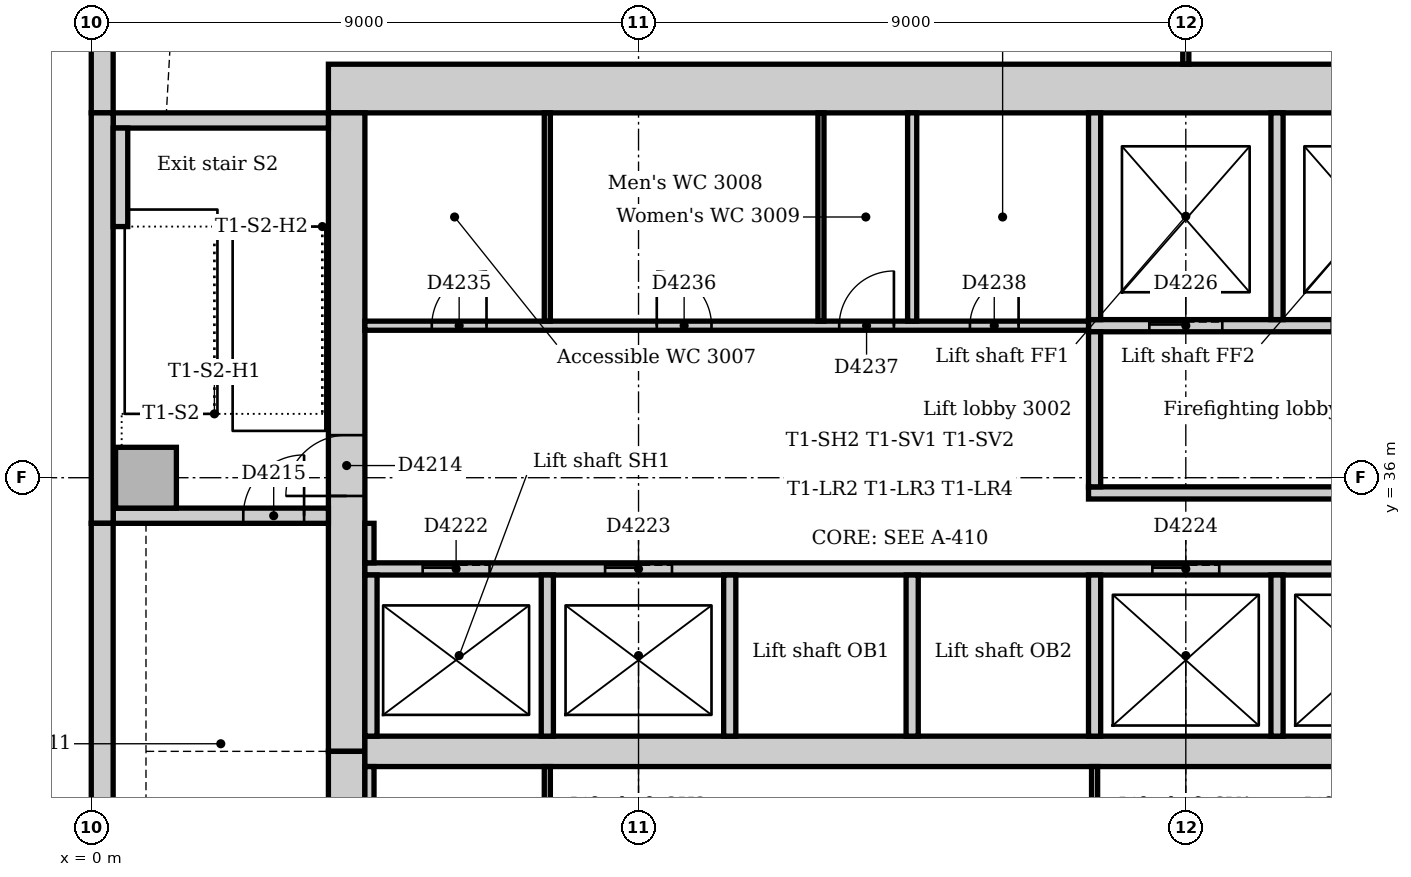
"""IFC4 building model, lengths in metres.
Left out: names, types, materials, properties, quantities, classifications, styles, units other than length and angle.
Written with IfcOpenShell. Run it as: python <this file> out.ifc"""

import sys

from ifc_helpers import new_model, si_unit, direction, frame, frame_2d, origin, origin_2d, place, context, subcontext, project, spatial, rectangle, extrude, element, fill, save


model = new_model("IFC4")
c1 = context("Model", 3, precision=1e-05, world=origin(), true_north=direction((0.0, 1.0)))
c2 = subcontext(c1, "Body", "Model", "MODEL_VIEW")
j1 = project(units=[si_unit("LENGTHUNIT", "METRE"), si_unit("PLANEANGLEUNIT", "RADIAN")], contexts=[c1])
p1 = place(None, origin())
s1 = spatial("IfcSite", under=j1, at=p1, CompositionType="ELEMENT")
p2 = place(p1, origin())
s2 = spatial("IfcBuilding", under=s1, at=p2, CompositionType="ELEMENT")
p3 = place(p2, frame((0.0, 0.0, 128.0)))
s3 = spatial("IfcBuildingStorey", under=s2, at=p3, CompositionType="ELEMENT", Elevation=128.0)
p4 = place(p3, frame((23.3, 42.4, 0.0), z_axis=(0.0, 0.0, 1.0), x_axis=(-1.0, 0.0, 0.0)))
e1 = element("IfcWall", 1, at=p4, inside=s3, PredefinedType="SOLIDWALL", context=c2, shape_type="SweptSolid", body=[
    extrude(rectangle(XDim=19.4, YDim=0.8, at=frame_2d((9.7, 0.0))), origin(), (0.0, 0.0, 1.0), 4.0),
])
p5 = place(p3, frame((4.2, 42.0, 0.0), z_axis=(0.0, 0.0, 1.0), x_axis=(0.0, -1.0, 0.0)))
e2 = element("IfcWall", 2, at=p5, inside=s3, PredefinedType="SOLIDWALL", context=c2, shape_type="SweptSolid", body=[
    extrude(rectangle(XDim=10.5, YDim=0.6, at=frame_2d((5.25, 0.0))), origin(), (0.0, 0.0, 1.0), 4.0),
])
p6 = place(p5, frame((5.3, 0.0, 0.0)))
e3 = element("IfcOpeningElement", 3, at=p6, cuts=e2, PredefinedType="OPENING", context=c2, shape_type="SweptSolid", body=[
    extrude(rectangle(XDim=1.0, YDim=2.1, at=frame_2d((0.5, 1.05))), frame((0.0, 0.31, 0.0), z_axis=(0.0, -1.0, 0.0), x_axis=(1.0, 0.0, 0.0)), (0.0, 0.0, 1.0), 0.62),
])
p7 = place(p3, frame((4.2, 31.5, 0.0), z_axis=(0.0, 0.0, 1.0), x_axis=(0.0, -1.0, 0.0)))
e4 = element("IfcWall", 4, at=p7, inside=s3, PredefinedType="SOLIDWALL", context=c2, shape_type="SweptSolid", body=[
    extrude(rectangle(XDim=10.5, YDim=0.6, at=frame_2d((5.25, 0.0))), origin(), (0.0, 0.0, 1.0), 4.0),
])
p8 = place(p7, frame((4.25, 0.0, 0.0)))
e5 = element("IfcOpeningElement", 5, at=p8, cuts=e4, PredefinedType="OPENING", context=c2, shape_type="SweptSolid", body=[
    extrude(rectangle(XDim=1.0, YDim=2.1, at=frame_2d((0.5, 1.05))), frame((0.0, 0.31, 0.0), z_axis=(0.0, -1.0, 0.0), x_axis=(1.0, 0.0, 0.0)), (0.0, 0.0, 1.0), 0.62),
])
p9 = place(p3, frame((4.5, 31.5, 0.0), z_axis=(0.0, 0.0, 1.0), x_axis=(1.0, 0.0, 0.0)))
e6 = element("IfcWall", 6, at=p9, inside=s3, PredefinedType="SOLIDWALL", context=c2, shape_type="SweptSolid", body=[
    extrude(rectangle(XDim=18.0, YDim=0.5, at=frame_2d((9.0, 0.0))), origin(), (0.0, 0.0, 1.0), 4.0),
])
p10 = place(p3, frame((0.36, 35.375, 0.0), z_axis=(0.0, 0.0, 1.0), x_axis=(1.0, 0.0, 0.0)))
e7 = element("IfcWall", 7, at=p10, inside=s3, PredefinedType="SOLIDWALL", context=c2, shape_type="SweptSolid", body=[
    extrude(rectangle(XDim=3.54, YDim=0.25, at=frame_2d((1.77, 0.0))), origin(), (0.0, 0.0, 1.0), 4.0),
])
p11 = place(p10, frame((2.14, 0.0, 0.0)))
e8 = element("IfcOpeningElement", 8, at=p11, cuts=e7, PredefinedType="OPENING", context=c2, shape_type="SweptSolid", body=[
    extrude(rectangle(XDim=1.0, YDim=2.1, at=frame_2d((0.5, 1.05))), frame((0.0, 0.135, 0.0), z_axis=(0.0, -1.0, 0.0), x_axis=(1.0, 0.0, 0.0)), (0.0, 0.0, 1.0), 0.27),
])
p12 = place(p3, frame((3.9, 41.875, 0.0), z_axis=(0.0, 0.0, 1.0), x_axis=(-1.0, 0.0, 0.0)))
e9 = element("IfcWall", 9, at=p12, inside=s3, PredefinedType="SOLIDWALL", context=c2, shape_type="SweptSolid", body=[
    extrude(rectangle(XDim=3.54, YDim=0.25, at=frame_2d((1.77, 0.0))), origin(), (0.0, 0.0, 1.0), 4.0),
])
p13 = place(p3, frame((0.9, 36.0, 0.0), z_axis=(0.0, 0.0, 1.0), x_axis=(1.0, 0.0, 0.0)))
e10 = element("IfcColumn", 10, at=p13, inside=s3, PredefinedType="COLUMN", context=c2, shape_type="SweptSolid", body=[
    extrude(rectangle(XDim=1.0, YDim=1.0, at=origin_2d()), origin(), (0.0, 0.0, 1.0), 4.0),
])
p14 = place(p3, frame((0.18, 45.257, 0.0), z_axis=(0.0, 0.0, 1.0), x_axis=(0.0, -1.0, 0.0)))
e11 = element("IfcWall", 11, at=p14, inside=s3, PredefinedType="STANDARD", context=c2, shape_type="SweptSolid", body=[
    extrude(rectangle(XDim=3.257, YDim=0.36, at=frame_2d((1.629, 0.0))), origin(), (0.0, 0.0, 1.0), 3.85),
])
p15 = place(p3, frame((0.18, 42.0, 0.0), z_axis=(0.0, 0.0, 1.0), x_axis=(0.0, -1.0, 0.0)))
e12 = element("IfcWall", 12, at=p15, inside=s3, PredefinedType="STANDARD", context=c2, shape_type="SweptSolid", body=[
    extrude(rectangle(XDim=6.75, YDim=0.36, at=frame_2d((3.375, 0.0))), origin(), (0.0, 0.0, 1.0), 3.85),
])
p16 = place(p3, frame((0.18, 35.25, 0.0), z_axis=(0.0, 0.0, 1.0), x_axis=(0.0, -1.0, 0.0)))
e13 = element("IfcWall", 13, at=p16, inside=s3, PredefinedType="STANDARD", context=c2, shape_type="SweptSolid", body=[
    extrude(rectangle(XDim=7.5, YDim=0.36, at=frame_2d((3.75, 0.0))), origin(), (0.0, 0.0, 1.0), 3.85),
])
p17 = place(p3, frame((0.48, 40.13, 0.0), z_axis=(0.0, 0.0, 1.0), x_axis=(0.0, 1.0, 0.0)))
e14 = element("IfcWall", 14, at=p17, inside=s3, PredefinedType="STANDARD", context=c2, shape_type="SweptSolid", body=[
    extrude(rectangle(XDim=1.62, YDim=0.24, at=frame_2d((0.81, 0.0))), origin(), (0.0, 0.0, 1.0), 4.0),
])
p18 = place(p3, frame((16.4, 35.75, 0.0), z_axis=(0.0, 0.0, 1.0), x_axis=(1.0, 0.0, 0.0)))
e15 = element("IfcWall", 15, at=p18, inside=s3, PredefinedType="PARTITIONING", context=c2, shape_type="SweptSolid", body=[
    extrude(rectangle(XDim=6.1, YDim=0.2, at=frame_2d((3.05, 0.0))), origin(), (0.0, 0.0, 1.0), 3.85),
])
p19 = place(p3, frame((16.4, 38.5, 0.0), z_axis=(0.0, 0.0, 1.0), x_axis=(1.0, 0.0, 0.0)))
e16 = element("IfcWall", 16, at=p19, inside=s3, PredefinedType="PARTITIONING", context=c2, shape_type="SweptSolid", body=[
    extrude(rectangle(XDim=6.1, YDim=0.2, at=frame_2d((3.05, 0.0))), origin(), (0.0, 0.0, 1.0), 3.85),
])
p20 = place(p19, frame((1.0, 0.0, 0.0)))
e17 = element("IfcOpeningElement", 17, at=p20, cuts=e16, PredefinedType="OPENING", context=c2, shape_type="SweptSolid", body=[
    extrude(rectangle(XDim=1.2, YDim=2.1, at=frame_2d((0.6, 1.05))), frame((0.0, 0.11, 0.0), z_axis=(0.0, -1.0, 0.0), x_axis=(1.0, 0.0, 0.0)), (0.0, 0.0, 1.0), 0.22),
])
p21 = place(p19, frame((4.0, 0.0, 0.0)))
e18 = element("IfcOpeningElement", 18, at=p21, cuts=e16, PredefinedType="OPENING", context=c2, shape_type="SweptSolid", body=[
    extrude(rectangle(XDim=1.2, YDim=2.1, at=frame_2d((0.6, 1.05))), frame((0.0, 0.11, 0.0), z_axis=(0.0, -1.0, 0.0), x_axis=(1.0, 0.0, 0.0)), (0.0, 0.0, 1.0), 0.22),
])
p22 = place(p3, frame((16.5, 35.85, 0.0), z_axis=(0.0, 0.0, 1.0), x_axis=(0.0, 1.0, 0.0)))
e19 = element("IfcWall", 19, at=p22, inside=s3, PredefinedType="PARTITIONING", context=c2, shape_type="SweptSolid", body=[
    extrude(rectangle(XDim=2.55, YDim=0.2, at=frame_2d((1.275, 0.0))), origin(), (0.0, 0.0, 1.0), 3.85),
])
p23 = place(p3, frame((4.5, 34.5, 0.0), z_axis=(0.0, 0.0, 1.0), x_axis=(1.0, 0.0, 0.0)))
e20 = element("IfcWall", 20, at=p23, inside=s3, PredefinedType="PARTITIONING", context=c2, shape_type="SweptSolid", body=[
    extrude(rectangle(XDim=18.0, YDim=0.2, at=frame_2d((9.0, 0.0))), origin(), (0.0, 0.0, 1.0), 3.85),
])
p24 = place(p23, frame((0.95, 0.0, 0.0)))
e21 = element("IfcOpeningElement", 21, at=p24, cuts=e20, PredefinedType="OPENING", context=c2, shape_type="SweptSolid", body=[
    extrude(rectangle(XDim=1.1, YDim=2.1, at=frame_2d((0.55, 1.05))), frame((0.0, 0.11, 0.0), z_axis=(0.0, -1.0, 0.0), x_axis=(1.0, 0.0, 0.0)), (0.0, 0.0, 1.0), 0.22),
])
p25 = place(p23, frame((3.95, 0.0, 0.0)))
e22 = element("IfcOpeningElement", 22, at=p25, cuts=e20, PredefinedType="OPENING", context=c2, shape_type="SweptSolid", body=[
    extrude(rectangle(XDim=1.1, YDim=2.1, at=frame_2d((0.55, 1.05))), frame((0.0, 0.11, 0.0), z_axis=(0.0, -1.0, 0.0), x_axis=(1.0, 0.0, 0.0)), (0.0, 0.0, 1.0), 0.22),
])
p26 = place(p23, frame((12.95, 0.0, 0.0)))
e23 = element("IfcOpeningElement", 23, at=p26, cuts=e20, PredefinedType="OPENING", context=c2, shape_type="SweptSolid", body=[
    extrude(rectangle(XDim=1.1, YDim=2.1, at=frame_2d((0.55, 1.05))), frame((0.0, 0.11, 0.0), z_axis=(0.0, -1.0, 0.0), x_axis=(1.0, 0.0, 0.0)), (0.0, 0.0, 1.0), 0.22),
])
p27 = place(p23, frame((15.95, 0.0, 0.0)))
e24 = element("IfcOpeningElement", 24, at=p27, cuts=e20, PredefinedType="OPENING", context=c2, shape_type="SweptSolid", body=[
    extrude(rectangle(XDim=1.1, YDim=2.1, at=frame_2d((0.55, 1.05))), frame((0.0, 0.11, 0.0), z_axis=(0.0, -1.0, 0.0), x_axis=(1.0, 0.0, 0.0)), (0.0, 0.0, 1.0), 0.22),
])
for number, where, z_axis, x_axis in (
    (25, (16.5, 38.6, 0.0), (0.0, 0.0, 1.0), (0.0, 1.0, 0.0)),
    (26, (19.5, 38.6, 0.0), (0.0, 0.0, 1.0), (0.0, 1.0, 0.0)),
):
    element("IfcWall", number, at=place(p3, frame(where, z_axis=z_axis, x_axis=x_axis)), inside=s3, PredefinedType="PARTITIONING", context=c2, shape_type="SweptSolid", body=[
        extrude(rectangle(XDim=3.4, YDim=0.2, at=frame_2d((1.7, 0.0))), origin(), (0.0, 0.0, 1.0), 3.85),
    ])
for number, where, z_axis, x_axis in (
    (27, (4.6, 31.75, 0.0), (0.0, 0.0, 1.0), (0.0, 1.0, 0.0)),
    (28, (7.5, 31.75, 0.0), (0.0, 0.0, 1.0), (0.0, 1.0, 0.0)),
    (29, (10.5, 31.75, 0.0), (0.0, 0.0, 1.0), (0.0, 1.0, 0.0)),
    (30, (13.5, 31.75, 0.0), (0.0, 0.0, 1.0), (0.0, 1.0, 0.0)),
    (31, (16.5, 31.75, 0.0), (0.0, 0.0, 1.0), (0.0, 1.0, 0.0)),
    (32, (19.5, 31.75, 0.0), (0.0, 0.0, 1.0), (0.0, 1.0, 0.0)),
):
    element("IfcWall", number, at=place(p3, frame(where, z_axis=z_axis, x_axis=x_axis)), inside=s3, PredefinedType="PARTITIONING", context=c2, shape_type="SweptSolid", body=[
        extrude(rectangle(XDim=2.65, YDim=0.2, at=frame_2d((1.325, 0.0))), origin(), (0.0, 0.0, 1.0), 3.85),
    ])
p28 = place(p3, frame((4.5, 38.5, 0.0), z_axis=(0.0, 0.0, 1.0), x_axis=(1.0, 0.0, 0.0)))
e33 = element("IfcWall", 33, at=p28, inside=s3, PredefinedType="PARTITIONING", context=c2, shape_type="SweptSolid", body=[
    extrude(rectangle(XDim=11.9, YDim=0.15, at=frame_2d((5.95, 0.0))), origin(), (0.0, 0.0, 1.0), 3.85),
])
p29 = place(p28, frame((1.1, 0.0, 0.0)))
e34 = element("IfcOpeningElement", 34, at=p29, cuts=e33, PredefinedType="OPENING", context=c2, shape_type="SweptSolid", body=[
    extrude(rectangle(XDim=0.9, YDim=2.1, at=frame_2d((0.45, 1.05))), frame((0.0, 0.085, 0.0), z_axis=(0.0, -1.0, 0.0), x_axis=(1.0, 0.0, 0.0)), (0.0, 0.0, 1.0), 0.17),
])
p30 = place(p28, frame((4.8, 0.0, 0.0)))
e35 = element("IfcOpeningElement", 35, at=p30, cuts=e33, PredefinedType="OPENING", context=c2, shape_type="SweptSolid", body=[
    extrude(rectangle(XDim=0.9, YDim=2.1, at=frame_2d((0.45, 1.05))), frame((0.0, 0.085, 0.0), z_axis=(0.0, -1.0, 0.0), x_axis=(1.0, 0.0, 0.0)), (0.0, 0.0, 1.0), 0.17),
])
p31 = place(p28, frame((7.8, 0.0, 0.0)))
e36 = element("IfcOpeningElement", 36, at=p31, cuts=e33, PredefinedType="OPENING", context=c2, shape_type="SweptSolid", body=[
    extrude(rectangle(XDim=0.9, YDim=2.1, at=frame_2d((0.45, 1.05))), frame((0.0, 0.085, 0.0), z_axis=(0.0, -1.0, 0.0), x_axis=(1.0, 0.0, 0.0)), (0.0, 0.0, 1.0), 0.17),
])
p32 = place(p28, frame((9.95, 0.0, 0.0)))
e37 = element("IfcOpeningElement", 37, at=p32, cuts=e33, PredefinedType="OPENING", context=c2, shape_type="SweptSolid", body=[
    extrude(rectangle(XDim=0.8, YDim=2.1, at=frame_2d((0.4, 1.05))), frame((0.0, 0.085, 0.0), z_axis=(0.0, -1.0, 0.0), x_axis=(1.0, 0.0, 0.0)), (0.0, 0.0, 1.0), 0.17),
])
p33 = place(p3, frame((4.575, 28.575, 0.0), z_axis=(0.0, 0.0, 1.0), x_axis=(0.0, 1.0, 0.0)))
e38 = element("IfcWall", 38, at=p33, inside=s3, PredefinedType="PARTITIONING", context=c2, shape_type="SweptSolid", body=[
    extrude(rectangle(XDim=2.675, YDim=0.15, at=frame_2d((1.337, 0.0))), origin(), (0.0, 0.0, 1.0), 3.85),
])
p34 = place(p3, frame((4.575, 34.6, 0.0), z_axis=(0.0, 0.0, 1.0), x_axis=(0.0, 1.0, 0.0)))
e39 = element("IfcWall", 39, at=p34, inside=s3, PredefinedType="PARTITIONING", context=c2, shape_type="SweptSolid", body=[
    extrude(rectangle(XDim=0.65, YDim=0.15, at=frame_2d((0.325, 0.0))), origin(), (0.0, 0.0, 1.0), 3.85),
])
p35 = place(p3, frame((13.5, 38.575, 0.0), z_axis=(0.0, 0.0, 1.0), x_axis=(0.0, 1.0, 0.0)))
e40 = element("IfcWall", 40, at=p35, inside=s3, PredefinedType="PARTITIONING", context=c2, shape_type="SweptSolid", body=[
    extrude(rectangle(XDim=3.425, YDim=0.15, at=frame_2d((1.712, 0.0))), origin(), (0.0, 0.0, 1.0), 3.85),
])
p36 = place(p3, frame((18.0, 42.8, 0.0), z_axis=(0.0, 0.0, 1.0), x_axis=(0.0, 1.0, 0.0)))
e41 = element("IfcWall", 41, at=p36, inside=s3, PredefinedType="PARTITIONING", context=c2, shape_type="SweptSolid", body=[
    extrude(rectangle(XDim=0.8, YDim=0.1, at=frame_2d((0.4, 0.0))), origin(), (0.0, 0.0, 1.0), 3.85),
])
for number, where, z_axis, x_axis in (
    (42, (7.5, 38.575, 0.0), (0.0, 0.0, 1.0), (0.0, 1.0, 0.0)),
    (43, (12.0, 38.575, 0.0), (0.0, 0.0, 1.0), (0.0, 1.0, 0.0)),
):
    element("IfcWall", number, at=place(p3, frame(where, z_axis=z_axis, x_axis=x_axis)), inside=s3, PredefinedType="PARTITIONING", context=c2, shape_type="SweptSolid", body=[
        extrude(rectangle(XDim=3.425, YDim=0.1, at=frame_2d((1.712, 0.0))), origin(), (0.0, 0.0, 1.0), 3.85),
    ])
for number, where, z_axis, x_axis in (
    (44, (7.5, 28.575, 0.0), (0.0, 0.0, 1.0), (0.0, 1.0, 0.0)),
    (45, (16.5, 28.575, 0.0), (0.0, 0.0, 1.0), (0.0, 1.0, 0.0)),
):
    element("IfcWall", number, at=place(p3, frame(where, z_axis=z_axis, x_axis=x_axis)), inside=s3, PredefinedType="PARTITIONING", context=c2, shape_type="SweptSolid", body=[
        extrude(rectangle(XDim=2.675, YDim=0.1, at=frame_2d((1.337, 0.0))), origin(), (0.0, 0.0, 1.0), 3.85),
    ])
p37 = place(p6, frame((1.0, 0.0, 0.0), z_axis=(0.0, 0.0, 1.0), x_axis=(-1.0, 0.0, 0.0)))
e46 = element("IfcDoor", 46, at=p37, inside=s3, OperationType="SINGLE_SWING_LEFT", PredefinedType="DOOR", context=c2, shape_type="SweptSolid", body=[
    extrude(rectangle(XDim=1.0, YDim=2.1, at=frame_2d((0.5, 1.05))), frame((0.0, 0.025, 0.0), z_axis=(0.0, -1.0, 0.0), x_axis=(1.0, 0.0, 0.0)), (0.0, 0.0, 1.0), 0.05),
])
fill(e3, e46)
p38 = place(p11, origin())
e47 = element("IfcDoor", 47, at=p38, inside=s3, OperationType="SINGLE_SWING_RIGHT", PredefinedType="DOOR", context=c2, shape_type="SweptSolid", body=[
    extrude(rectangle(XDim=1.0, YDim=2.1, at=frame_2d((0.5, 1.05))), frame((0.0, 0.025, 0.0), z_axis=(0.0, -1.0, 0.0), x_axis=(1.0, 0.0, 0.0)), (0.0, 0.0, 1.0), 0.05),
])
fill(e8, e47)
p39 = place(p24, origin())
e48 = element("IfcDoor", 48, at=p39, inside=s3, OperationType="SLIDING_TO_LEFT", PredefinedType="DOOR", context=c2, shape_type="SweptSolid", body=[
    extrude(rectangle(XDim=1.1, YDim=2.1, at=frame_2d((0.55, 1.05))), frame((0.0, 0.025, 0.0), z_axis=(0.0, -1.0, 0.0), x_axis=(1.0, 0.0, 0.0)), (0.0, 0.0, 1.0), 0.05),
])
fill(e21, e48)
p40 = place(p25, origin())
e49 = element("IfcDoor", 49, at=p40, inside=s3, OperationType="SLIDING_TO_LEFT", PredefinedType="DOOR", context=c2, shape_type="SweptSolid", body=[
    extrude(rectangle(XDim=1.1, YDim=2.1, at=frame_2d((0.55, 1.05))), frame((0.0, 0.025, 0.0), z_axis=(0.0, -1.0, 0.0), x_axis=(1.0, 0.0, 0.0)), (0.0, 0.0, 1.0), 0.05),
])
fill(e22, e49)
p41 = place(p26, origin())
e50 = element("IfcDoor", 50, at=p41, inside=s3, OperationType="SLIDING_TO_LEFT", PredefinedType="DOOR", context=c2, shape_type="SweptSolid", body=[
    extrude(rectangle(XDim=1.1, YDim=2.1, at=frame_2d((0.55, 1.05))), frame((0.0, 0.025, 0.0), z_axis=(0.0, -1.0, 0.0), x_axis=(1.0, 0.0, 0.0)), (0.0, 0.0, 1.0), 0.05),
])
fill(e23, e50)
p42 = place(p20, origin())
e51 = element("IfcDoor", 51, at=p42, inside=s3, OperationType="SLIDING_TO_LEFT", PredefinedType="DOOR", context=c2, shape_type="SweptSolid", body=[
    extrude(rectangle(XDim=1.2, YDim=2.1, at=frame_2d((0.6, 1.05))), frame((0.0, 0.025, 0.0), z_axis=(0.0, -1.0, 0.0), x_axis=(1.0, 0.0, 0.0)), (0.0, 0.0, 1.0), 0.05),
])
fill(e17, e51)
p43 = place(p29, origin())
e52 = element("IfcDoor", 52, at=p43, inside=s3, OperationType="SINGLE_SWING_RIGHT", PredefinedType="DOOR", context=c2, shape_type="SweptSolid", body=[
    extrude(rectangle(XDim=0.9, YDim=2.1, at=frame_2d((0.45, 1.05))), frame((0.0, 0.025, 0.0), z_axis=(0.0, -1.0, 0.0), x_axis=(1.0, 0.0, 0.0)), (0.0, 0.0, 1.0), 0.05),
])
fill(e34, e52)
p44 = place(p30, origin())
e53 = element("IfcDoor", 53, at=p44, inside=s3, OperationType="SINGLE_SWING_LEFT", PredefinedType="DOOR", context=c2, shape_type="SweptSolid", body=[
    extrude(rectangle(XDim=0.9, YDim=2.1, at=frame_2d((0.45, 1.05))), frame((0.0, 0.025, 0.0), z_axis=(0.0, -1.0, 0.0), x_axis=(1.0, 0.0, 0.0)), (0.0, 0.0, 1.0), 0.05),
])
fill(e35, e53)
p45 = place(p31, origin())
e54 = element("IfcDoor", 54, at=p45, inside=s3, OperationType="SINGLE_SWING_RIGHT", PredefinedType="DOOR", context=c2, shape_type="SweptSolid", body=[
    extrude(rectangle(XDim=0.9, YDim=2.1, at=frame_2d((0.45, 1.05))), frame((0.0, 0.025, 0.0), z_axis=(0.0, -1.0, 0.0), x_axis=(1.0, 0.0, 0.0)), (0.0, 0.0, 1.0), 0.05),
])
fill(e36, e54)
p46 = place(p32, origin())
e55 = element("IfcDoor", 55, at=p46, inside=s3, OperationType="SINGLE_SWING_RIGHT", PredefinedType="DOOR", context=c2, shape_type="SweptSolid", body=[
    extrude(rectangle(XDim=0.8, YDim=2.1, at=frame_2d((0.4, 1.05))), frame((0.0, 0.025, 0.0), z_axis=(0.0, -1.0, 0.0), x_axis=(1.0, 0.0, 0.0)), (0.0, 0.0, 1.0), 0.05),
])
fill(e37, e55)
save(model, sys.argv[1])
